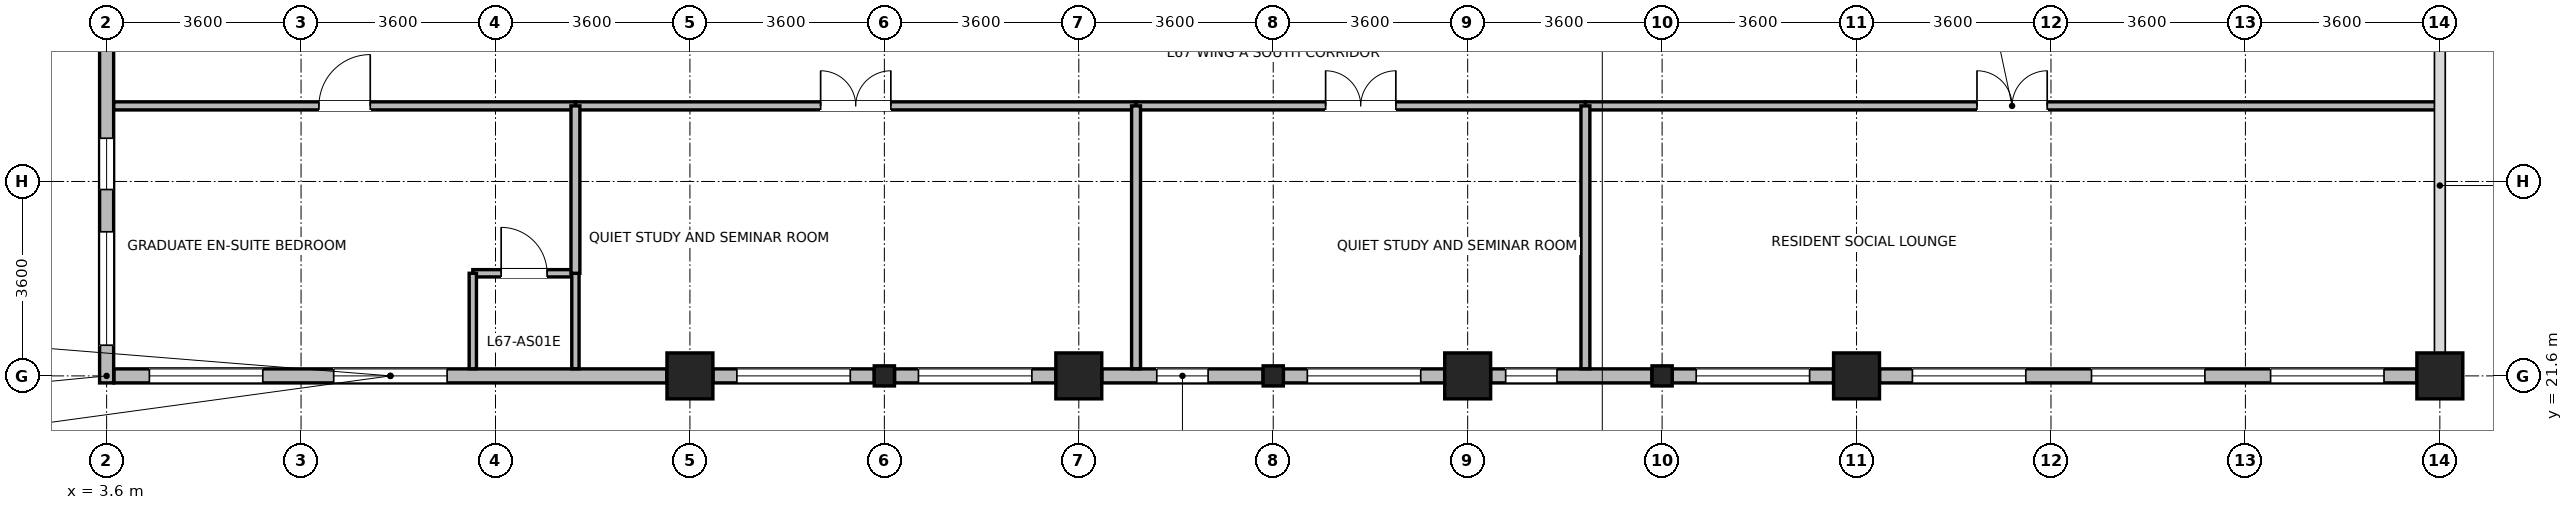
"""IFC4 building model, lengths in metres.
Left out: names, types, materials, properties, quantities, classifications, styles, units other than length and angle.
Written with IfcOpenShell. Run it as: python <this file> out.ifc"""

import sys

from ifc_helpers import new_model, si_unit, direction, frame, frame_2d, origin, origin_2d, place, context, subcontext, project, spatial, rectangle, i_section, extrude, source, transform, mapped, element, fill, save


model = new_model("IFC4")
c1 = context("Model", 3, precision=1e-05, world=origin(), true_north=direction((0.0, 1.0)))
c2 = subcontext(c1, "Body", "Model", "MODEL_VIEW")
j1 = project(units=[si_unit("LENGTHUNIT", "METRE"), si_unit("PLANEANGLEUNIT", "RADIAN")], contexts=[c1])
p1 = place(None, origin())
s1 = spatial("IfcSite", under=j1, at=p1, CompositionType="ELEMENT")
p2 = place(p1, origin())
s2 = spatial("IfcBuilding", under=s1, at=p2, CompositionType="ELEMENT")
p3 = place(p2, frame((0.0, 0.0, 261.0)))
s3 = spatial("IfcBuildingStorey", under=s2, at=p3, CompositionType="ELEMENT", Elevation=261.0)
m1 = source(origin(), c2, "Body", "SweptSolid", [
    extrude(rectangle(XDim=0.85, YDim=0.85, at=origin_2d()), origin(), (0.0, 0.0, 1.0), 3.7),
])
for number, where, z_axis, x_axis in (
    (1, (14.4, 21.6, 0.0), (0.0, 0.0, 1.0), (1.0, 0.0, 0.0)),
    (2, (21.6, 21.6, 0.0), (0.0, 0.0, 1.0), (1.0, 0.0, 0.0)),
    (3, (28.8, 21.6, 0.0), (0.0, 0.0, 1.0), (1.0, 0.0, 0.0)),
    (4, (36.0, 21.6, 0.0), (0.0, 0.0, 1.0), (1.0, 0.0, 0.0)),
    (5, (46.8, 21.6, 0.0), (0.0, 0.0, 1.0), (1.0, 0.0, 0.0)),
):
    element("IfcColumn", number, at=place(p3, frame(where, z_axis=z_axis, x_axis=x_axis)), inside=s3, PredefinedType="COLUMN", context=c2, shape_type="MappedRepresentation", body=[
        mapped(m1, transform((0.0, 0.0, 0.0), x_axis=(1.0, 0.0, 0.0), y_axis=(0.0, 1.0, 0.0), z_axis=(0.0, 0.0, 1.0), scale=1.0)),
    ])
m2 = source(origin(), c2, "Body", "SweptSolid", [
    extrude(i_section(OverallWidth=0.374, OverallDepth=0.372, WebThickness=0.015, FlangeThickness=0.026, FilletRadius=0.015, at=origin_2d()), origin(), (0.0, 0.0, 1.0), 3.7),
])
for number, where, z_axis, x_axis in (
    (6, (18.0, 21.6, 0.0), (0.0, 0.0, 1.0), (1.0, 0.0, 0.0)),
    (7, (25.2, 21.6, 0.0), (0.0, 0.0, 1.0), (1.0, 0.0, 0.0)),
    (8, (32.4, 21.6, 0.0), (0.0, 0.0, 1.0), (1.0, 0.0, 0.0)),
):
    element("IfcColumn", number, at=place(p3, frame(where, z_axis=z_axis, x_axis=x_axis)), inside=s3, PredefinedType="COLUMN", context=c2, shape_type="MappedRepresentation", body=[
        mapped(m2, transform((0.0, 0.0, 0.0), x_axis=(1.0, 0.0, 0.0), y_axis=(0.0, 1.0, 0.0), z_axis=(0.0, 0.0, 1.0), scale=1.0)),
    ])
p4 = place(p3, frame((13.974, 21.6, 0.0), z_axis=(0.0, 0.0, 1.0), x_axis=(-1.0, 0.0, 0.0)))
e9 = element("IfcWall", 9, at=p4, inside=s3, PredefinedType="STANDARD", context=c2, shape_type="SweptSolid", body=[
    extrude(rectangle(XDim=10.239, YDim=0.26, at=frame_2d((5.12, 0.0))), origin(), (0.0, 0.0, 1.0), 3.455),
])
p5 = place(p4, frame((4.07, 0.0, 0.85)))
e10 = element("IfcOpeningElement", 10, at=p5, cuts=e9, PredefinedType="OPENING", context=c2, shape_type="SweptSolid", body=[
    extrude(rectangle(XDim=2.1, YDim=1.95, at=frame_2d((1.05, 0.975))), frame((0.0, 0.14, 0.0), z_axis=(0.0, -1.0, 0.0), x_axis=(1.0, 0.0, 0.0)), (0.0, 0.0, 1.0), 0.28),
])
p6 = place(p4, frame((7.482, 0.0, 0.85)))
e11 = element("IfcOpeningElement", 11, at=p6, cuts=e9, PredefinedType="OPENING", context=c2, shape_type="SweptSolid", body=[
    extrude(rectangle(XDim=2.1, YDim=1.95, at=frame_2d((1.05, 0.975))), frame((0.0, 0.14, 0.0), z_axis=(0.0, -1.0, 0.0), x_axis=(1.0, 0.0, 0.0)), (0.0, 0.0, 1.0), 0.28),
])
p7 = place(p3, frame((17.812, 21.6, 0.0), z_axis=(0.0, 0.0, 1.0), x_axis=(-1.0, 0.0, 0.0)))
e12 = element("IfcWall", 12, at=p7, inside=s3, PredefinedType="STANDARD", context=c2, shape_type="SweptSolid", body=[
    extrude(rectangle(XDim=2.986, YDim=0.26, at=frame_2d((1.493, 0.0))), origin(), (0.0, 0.0, 1.0), 3.055),
])
p8 = place(p7, frame((0.443, 0.0, 0.85)))
e13 = element("IfcOpeningElement", 13, at=p8, cuts=e12, PredefinedType="OPENING", context=c2, shape_type="SweptSolid", body=[
    extrude(rectangle(XDim=2.1, YDim=1.95, at=frame_2d((1.05, 0.975))), frame((0.0, 0.14, 0.0), z_axis=(0.0, -1.0, 0.0), x_axis=(1.0, 0.0, 0.0)), (0.0, 0.0, 1.0), 0.28),
])
p9 = place(p3, frame((21.174, 21.6, 0.0), z_axis=(0.0, 0.0, 1.0), x_axis=(-1.0, 0.0, 0.0)))
e14 = element("IfcWall", 14, at=p9, inside=s3, PredefinedType="STANDARD", context=c2, shape_type="SweptSolid", body=[
    extrude(rectangle(XDim=2.986, YDim=0.26, at=frame_2d((1.493, 0.0))), origin(), (0.0, 0.0, 1.0), 3.055),
])
p10 = place(p9, frame((0.443, 0.0, 0.85)))
e15 = element("IfcOpeningElement", 15, at=p10, cuts=e14, PredefinedType="OPENING", context=c2, shape_type="SweptSolid", body=[
    extrude(rectangle(XDim=2.1, YDim=1.95, at=frame_2d((1.05, 0.975))), frame((0.0, 0.14, 0.0), z_axis=(0.0, -1.0, 0.0), x_axis=(1.0, 0.0, 0.0)), (0.0, 0.0, 1.0), 0.28),
])
p11 = place(p3, frame((25.012, 21.6, 0.0), z_axis=(0.0, 0.0, 1.0), x_axis=(-1.0, 0.0, 0.0)))
e16 = element("IfcWall", 16, at=p11, inside=s3, PredefinedType="STANDARD", context=c2, shape_type="SweptSolid", body=[
    extrude(rectangle(XDim=2.986, YDim=0.26, at=frame_2d((1.493, 0.0))), origin(), (0.0, 0.0, 1.0), 3.055),
])
p12 = place(p11, frame((1.018, 0.0, 0.85)))
e17 = element("IfcOpeningElement", 17, at=p12, cuts=e16, PredefinedType="OPENING", context=c2, shape_type="SweptSolid", body=[
    extrude(rectangle(XDim=0.95, YDim=1.75, at=frame_2d((0.475, 0.875))), frame((0.0, 0.14, 0.0), z_axis=(0.0, -1.0, 0.0), x_axis=(1.0, 0.0, 0.0)), (0.0, 0.0, 1.0), 0.28),
])
p13 = place(p3, frame((28.374, 21.6, 0.0), z_axis=(0.0, 0.0, 1.0), x_axis=(-1.0, 0.0, 0.0)))
e18 = element("IfcWall", 18, at=p13, inside=s3, PredefinedType="STANDARD", context=c2, shape_type="SweptSolid", body=[
    extrude(rectangle(XDim=2.986, YDim=0.26, at=frame_2d((1.493, 0.0))), origin(), (0.0, 0.0, 1.0), 3.055),
])
p14 = place(p13, frame((0.443, 0.0, 0.85)))
e19 = element("IfcOpeningElement", 19, at=p14, cuts=e18, PredefinedType="OPENING", context=c2, shape_type="SweptSolid", body=[
    extrude(rectangle(XDim=2.1, YDim=1.95, at=frame_2d((1.05, 0.975))), frame((0.0, 0.14, 0.0), z_axis=(0.0, -1.0, 0.0), x_axis=(1.0, 0.0, 0.0)), (0.0, 0.0, 1.0), 0.28),
])
p15 = place(p3, frame((32.212, 21.6, 0.0), z_axis=(0.0, 0.0, 1.0), x_axis=(-1.0, 0.0, 0.0)))
e20 = element("IfcWall", 20, at=p15, inside=s3, PredefinedType="STANDARD", context=c2, shape_type="SweptSolid", body=[
    extrude(rectangle(XDim=2.986, YDim=0.26, at=frame_2d((1.493, 0.0))), origin(), (0.0, 0.0, 1.0), 3.055),
])
p16 = place(p15, frame((1.759, 0.0, 0.85)))
e21 = element("IfcOpeningElement", 21, at=p16, cuts=e20, PredefinedType="OPENING", context=c2, shape_type="SweptSolid", body=[
    extrude(rectangle(XDim=0.95, YDim=1.75, at=frame_2d((0.475, 0.875))), frame((0.0, 0.14, 0.0), z_axis=(0.0, -1.0, 0.0), x_axis=(1.0, 0.0, 0.0)), (0.0, 0.0, 1.0), 0.28),
])
p17 = place(p3, frame((35.574, 21.6, 0.0), z_axis=(0.0, 0.0, 1.0), x_axis=(-1.0, 0.0, 0.0)))
e22 = element("IfcWall", 22, at=p17, inside=s3, PredefinedType="STANDARD", context=c2, shape_type="SweptSolid", body=[
    extrude(rectangle(XDim=2.986, YDim=0.26, at=frame_2d((1.493, 0.0))), origin(), (0.0, 0.0, 1.0), 3.055),
])
p18 = place(p17, frame((0.443, 0.0, 0.85)))
e23 = element("IfcOpeningElement", 23, at=p18, cuts=e22, PredefinedType="OPENING", context=c2, shape_type="SweptSolid", body=[
    extrude(rectangle(XDim=2.1, YDim=1.95, at=frame_2d((1.05, 0.975))), frame((0.0, 0.14, 0.0), z_axis=(0.0, -1.0, 0.0), x_axis=(1.0, 0.0, 0.0)), (0.0, 0.0, 1.0), 0.28),
])
p19 = place(p3, frame((46.374, 21.6, 0.0), z_axis=(0.0, 0.0, 1.0), x_axis=(-1.0, 0.0, 0.0)))
e24 = element("IfcWall", 24, at=p19, inside=s3, PredefinedType="STANDARD", context=c2, shape_type="SweptSolid", body=[
    extrude(rectangle(XDim=9.948, YDim=0.26, at=frame_2d((4.974, 0.0))), origin(), (0.0, 0.0, 1.0), 3.055),
])
p20 = place(p19, frame((0.608, 0.0, 0.85)))
e25 = element("IfcOpeningElement", 25, at=p20, cuts=e24, PredefinedType="OPENING", context=c2, shape_type="SweptSolid", body=[
    extrude(rectangle(XDim=2.1, YDim=1.95, at=frame_2d((1.05, 0.975))), frame((0.0, 0.14, 0.0), z_axis=(0.0, -1.0, 0.0), x_axis=(1.0, 0.0, 0.0)), (0.0, 0.0, 1.0), 0.28),
])
p21 = place(p19, frame((3.924, 0.0, 0.85)))
e26 = element("IfcOpeningElement", 26, at=p21, cuts=e24, PredefinedType="OPENING", context=c2, shape_type="SweptSolid", body=[
    extrude(rectangle(XDim=2.1, YDim=1.95, at=frame_2d((1.05, 0.975))), frame((0.0, 0.14, 0.0), z_axis=(0.0, -1.0, 0.0), x_axis=(1.0, 0.0, 0.0)), (0.0, 0.0, 1.0), 0.28),
])
p22 = place(p19, frame((7.24, 0.0, 0.85)))
e27 = element("IfcOpeningElement", 27, at=p22, cuts=e24, PredefinedType="OPENING", context=c2, shape_type="SweptSolid", body=[
    extrude(rectangle(XDim=2.1, YDim=1.95, at=frame_2d((1.05, 0.975))), frame((0.0, 0.14, 0.0), z_axis=(0.0, -1.0, 0.0), x_axis=(1.0, 0.0, 0.0)), (0.0, 0.0, 1.0), 0.28),
])
p23 = place(p3, frame((3.6, 21.47, 0.0), z_axis=(0.0, 0.0, 1.0), x_axis=(0.0, 1.0, 0.0)))
e28 = element("IfcWall", 28, at=p23, inside=s3, PredefinedType="STANDARD", context=c2, shape_type="SweptSolid", body=[
    extrude(rectangle(XDim=6.993, YDim=0.26, at=frame_2d((3.497, 0.0))), origin(), (0.0, 0.0, 1.0), 3.455),
])
p24 = place(p23, frame((0.698, 0.0, 0.85)))
e29 = element("IfcOpeningElement", 29, at=p24, cuts=e28, PredefinedType="OPENING", context=c2, shape_type="SweptSolid", body=[
    extrude(rectangle(XDim=2.1, YDim=1.95, at=frame_2d((1.05, 0.975))), frame((0.0, 0.14, 0.0), z_axis=(0.0, -1.0, 0.0), x_axis=(1.0, 0.0, 0.0)), (0.0, 0.0, 1.0), 0.28),
])
p25 = place(p23, frame((3.581, 0.0, 0.85)))
e30 = element("IfcOpeningElement", 30, at=p25, cuts=e28, PredefinedType="OPENING", context=c2, shape_type="SweptSolid", body=[
    extrude(rectangle(XDim=0.95, YDim=1.75, at=frame_2d((0.475, 0.875))), frame((0.0, 0.14, 0.0), z_axis=(0.0, -1.0, 0.0), x_axis=(1.0, 0.0, 0.0)), (0.0, 0.0, 1.0), 0.28),
])
p26 = place(p3, frame((10.38, 23.5, 0.0), z_axis=(0.0, 0.0, 1.0), x_axis=(1.0, 0.0, 0.0)))
e31 = element("IfcWall", 31, at=p26, inside=s3, PredefinedType="PARTITIONING", context=c2, shape_type="SweptSolid", body=[
    extrude(rectangle(XDim=1.9, YDim=0.135, at=frame_2d((0.95, 0.0))), origin(), (0.0, 0.0, 1.0), 3.455),
])
p27 = place(p26, frame((0.525, 0.0, 0.0)))
e32 = element("IfcOpeningElement", 32, at=p27, cuts=e31, PredefinedType="OPENING", context=c2, shape_type="SweptSolid", body=[
    extrude(rectangle(XDim=0.85, YDim=2.04, at=frame_2d((0.425, 1.02))), frame((0.0, 0.078, 0.0), z_axis=(0.0, -1.0, 0.0), x_axis=(1.0, 0.0, 0.0)), (0.0, 0.0, 1.0), 0.155),
])
for number, where, z_axis, x_axis in (
    (33, (10.38, 21.732, 0.0), (0.0, 0.0, 1.0), (0.0, 1.0, 0.0)),
    (34, (12.28, 21.732, 0.0), (0.0, 0.0, 1.0), (0.0, 1.0, 0.0)),
):
    element("IfcWall", number, at=place(p3, frame(where, z_axis=z_axis, x_axis=x_axis)), inside=s3, PredefinedType="PARTITIONING", context=c2, shape_type="SweptSolid", body=[
        extrude(rectangle(XDim=1.768, YDim=0.135, at=frame_2d((0.884, 0.0))), origin(), (0.0, 0.0, 1.0), 3.455),
    ])
p28 = place(p3, frame((30.98, 26.6, 0.0), z_axis=(0.0, 0.0, 1.0), x_axis=(1.0, 0.0, 0.0)))
e35 = element("IfcWall", 35, at=p28, inside=s3, PredefinedType="PARTITIONING", context=c2, shape_type="SweptSolid", body=[
    extrude(rectangle(XDim=15.8, YDim=0.15, at=frame_2d((7.9, 0.0))), origin(), (0.0, 0.0, 1.0), 3.455),
])
p29 = place(p28, frame((7.25, 0.0, 0.0)))
e36 = element("IfcOpeningElement", 36, at=p29, cuts=e35, PredefinedType="OPENING", context=c2, shape_type="SweptSolid", body=[
    extrude(rectangle(XDim=1.3, YDim=2.12, at=frame_2d((0.65, 1.06))), frame((0.0, 0.085, 0.0), z_axis=(0.0, -1.0, 0.0), x_axis=(1.0, 0.0, 0.0)), (0.0, 0.0, 1.0), 0.17),
])
p30 = place(p3, frame((12.28, 26.6, 0.0), z_axis=(0.0, 0.0, 1.0), x_axis=(1.0, 0.0, 0.0)))
e37 = element("IfcWall", 37, at=p30, inside=s3, PredefinedType="PARTITIONING", context=c2, shape_type="SweptSolid", body=[
    extrude(rectangle(XDim=10.38, YDim=0.15, at=frame_2d((5.19, 0.0))), origin(), (0.0, 0.0, 1.0), 3.455),
])
p31 = place(p30, frame((4.54, 0.0, 0.0)))
e38 = element("IfcOpeningElement", 38, at=p31, cuts=e37, PredefinedType="OPENING", context=c2, shape_type="SweptSolid", body=[
    extrude(rectangle(XDim=1.3, YDim=2.12, at=frame_2d((0.65, 1.06))), frame((0.0, 0.085, 0.0), z_axis=(0.0, -1.0, 0.0), x_axis=(1.0, 0.0, 0.0)), (0.0, 0.0, 1.0), 0.17),
])
p32 = place(p3, frame((3.732, 26.6, 0.0), z_axis=(0.0, 0.0, 1.0), x_axis=(1.0, 0.0, 0.0)))
e39 = element("IfcWall", 39, at=p32, inside=s3, PredefinedType="PARTITIONING", context=c2, shape_type="SweptSolid", body=[
    extrude(rectangle(XDim=8.548, YDim=0.15, at=frame_2d((4.274, 0.0))), origin(), (0.0, 0.0, 1.0), 3.455),
])
p33 = place(p32, frame((3.799, 0.0, 0.0)))
e40 = element("IfcOpeningElement", 40, at=p33, cuts=e39, PredefinedType="OPENING", context=c2, shape_type="SweptSolid", body=[
    extrude(rectangle(XDim=0.95, YDim=2.1, at=frame_2d((0.475, 1.05))), frame((0.0, 0.085, 0.0), z_axis=(0.0, -1.0, 0.0), x_axis=(1.0, 0.0, 0.0)), (0.0, 0.0, 1.0), 0.17),
])
p34 = place(p3, frame((22.66, 26.6, 0.0), z_axis=(0.0, 0.0, 1.0), x_axis=(1.0, 0.0, 0.0)))
e41 = element("IfcWall", 41, at=p34, inside=s3, PredefinedType="PARTITIONING", context=c2, shape_type="SweptSolid", body=[
    extrude(rectangle(XDim=8.32, YDim=0.15, at=frame_2d((4.16, 0.0))), origin(), (0.0, 0.0, 1.0), 3.455),
])
p35 = place(p34, frame((3.51, 0.0, 0.0)))
e42 = element("IfcOpeningElement", 42, at=p35, cuts=e41, PredefinedType="OPENING", context=c2, shape_type="SweptSolid", body=[
    extrude(rectangle(XDim=1.3, YDim=2.12, at=frame_2d((0.65, 1.06))), frame((0.0, 0.085, 0.0), z_axis=(0.0, -1.0, 0.0), x_axis=(1.0, 0.0, 0.0)), (0.0, 0.0, 1.0), 0.17),
])
for number, where, z_axis, x_axis in (
    (43, (22.66, 21.732, 0.0), (0.0, 0.0, 1.0), (0.0, 1.0, 0.0)),
    (44, (30.98, 21.732, 0.0), (0.0, 0.0, 1.0), (0.0, 1.0, 0.0)),
):
    element("IfcWall", number, at=place(p3, frame(where, z_axis=z_axis, x_axis=x_axis)), inside=s3, PredefinedType="PARTITIONING", context=c2, shape_type="SweptSolid", body=[
        extrude(rectangle(XDim=4.868, YDim=0.165, at=frame_2d((2.434, 0.0))), origin(), (0.0, 0.0, 1.0), 3.455),
    ])
p36 = place(p3, frame((12.28, 23.5, 0.0), z_axis=(0.0, 0.0, 1.0), x_axis=(0.0, 1.0, 0.0)))
e45 = element("IfcWall", 45, at=p36, inside=s3, PredefinedType="PARTITIONING", context=c2, shape_type="SweptSolid", body=[
    extrude(rectangle(XDim=3.1, YDim=0.165, at=frame_2d((1.55, 0.0))), origin(), (0.0, 0.0, 1.0), 3.455),
])
p37 = place(p5, origin())
e46 = element("IfcWindow", 46, at=p37, inside=s3, PartitioningType="SINGLE_PANEL", PredefinedType="WINDOW", context=c2, shape_type="SweptSolid", body=[
    extrude(rectangle(XDim=2.1, YDim=1.95, at=frame_2d((1.05, 0.975))), frame((0.0, 0.03, 0.0), z_axis=(0.0, -1.0, 0.0), x_axis=(1.0, 0.0, 0.0)), (0.0, 0.0, 1.0), 0.06),
])
fill(e10, e46)
p38 = place(p6, origin())
e47 = element("IfcWindow", 47, at=p38, inside=s3, PartitioningType="SINGLE_PANEL", PredefinedType="WINDOW", context=c2, shape_type="SweptSolid", body=[
    extrude(rectangle(XDim=2.1, YDim=1.95, at=frame_2d((1.05, 0.975))), frame((0.0, 0.03, 0.0), z_axis=(0.0, -1.0, 0.0), x_axis=(1.0, 0.0, 0.0)), (0.0, 0.0, 1.0), 0.06),
])
fill(e11, e47)
p39 = place(p8, origin())
e48 = element("IfcWindow", 48, at=p39, inside=s3, PartitioningType="SINGLE_PANEL", PredefinedType="WINDOW", context=c2, shape_type="SweptSolid", body=[
    extrude(rectangle(XDim=2.1, YDim=1.95, at=frame_2d((1.05, 0.975))), frame((0.0, 0.03, 0.0), z_axis=(0.0, -1.0, 0.0), x_axis=(1.0, 0.0, 0.0)), (0.0, 0.0, 1.0), 0.06),
])
fill(e13, e48)
p40 = place(p10, origin())
e49 = element("IfcWindow", 49, at=p40, inside=s3, PartitioningType="SINGLE_PANEL", PredefinedType="WINDOW", context=c2, shape_type="SweptSolid", body=[
    extrude(rectangle(XDim=2.1, YDim=1.95, at=frame_2d((1.05, 0.975))), frame((0.0, 0.03, 0.0), z_axis=(0.0, -1.0, 0.0), x_axis=(1.0, 0.0, 0.0)), (0.0, 0.0, 1.0), 0.06),
])
fill(e15, e49)
p41 = place(p12, origin())
e50 = element("IfcWindow", 50, at=p41, inside=s3, PartitioningType="SINGLE_PANEL", PredefinedType="WINDOW", context=c2, shape_type="SweptSolid", body=[
    extrude(rectangle(XDim=0.95, YDim=1.75, at=frame_2d((0.475, 0.875))), frame((0.0, 0.03, 0.0), z_axis=(0.0, -1.0, 0.0), x_axis=(1.0, 0.0, 0.0)), (0.0, 0.0, 1.0), 0.06),
])
fill(e17, e50)
p42 = place(p14, origin())
e51 = element("IfcWindow", 51, at=p42, inside=s3, PartitioningType="SINGLE_PANEL", PredefinedType="WINDOW", context=c2, shape_type="SweptSolid", body=[
    extrude(rectangle(XDim=2.1, YDim=1.95, at=frame_2d((1.05, 0.975))), frame((0.0, 0.03, 0.0), z_axis=(0.0, -1.0, 0.0), x_axis=(1.0, 0.0, 0.0)), (0.0, 0.0, 1.0), 0.06),
])
fill(e19, e51)
p43 = place(p16, origin())
e52 = element("IfcWindow", 52, at=p43, inside=s3, PartitioningType="SINGLE_PANEL", PredefinedType="WINDOW", context=c2, shape_type="SweptSolid", body=[
    extrude(rectangle(XDim=0.95, YDim=1.75, at=frame_2d((0.475, 0.875))), frame((0.0, 0.03, 0.0), z_axis=(0.0, -1.0, 0.0), x_axis=(1.0, 0.0, 0.0)), (0.0, 0.0, 1.0), 0.06),
])
fill(e21, e52)
p44 = place(p18, origin())
e53 = element("IfcWindow", 53, at=p44, inside=s3, PartitioningType="SINGLE_PANEL", PredefinedType="WINDOW", context=c2, shape_type="SweptSolid", body=[
    extrude(rectangle(XDim=2.1, YDim=1.95, at=frame_2d((1.05, 0.975))), frame((0.0, 0.03, 0.0), z_axis=(0.0, -1.0, 0.0), x_axis=(1.0, 0.0, 0.0)), (0.0, 0.0, 1.0), 0.06),
])
fill(e23, e53)
p45 = place(p20, origin())
e54 = element("IfcWindow", 54, at=p45, inside=s3, PartitioningType="SINGLE_PANEL", PredefinedType="WINDOW", context=c2, shape_type="SweptSolid", body=[
    extrude(rectangle(XDim=2.1, YDim=1.95, at=frame_2d((1.05, 0.975))), frame((0.0, 0.03, 0.0), z_axis=(0.0, -1.0, 0.0), x_axis=(1.0, 0.0, 0.0)), (0.0, 0.0, 1.0), 0.06),
])
fill(e25, e54)
p46 = place(p21, origin())
e55 = element("IfcWindow", 55, at=p46, inside=s3, PartitioningType="SINGLE_PANEL", PredefinedType="WINDOW", context=c2, shape_type="SweptSolid", body=[
    extrude(rectangle(XDim=2.1, YDim=1.95, at=frame_2d((1.05, 0.975))), frame((0.0, 0.03, 0.0), z_axis=(0.0, -1.0, 0.0), x_axis=(1.0, 0.0, 0.0)), (0.0, 0.0, 1.0), 0.06),
])
fill(e26, e55)
p47 = place(p22, origin())
e56 = element("IfcWindow", 56, at=p47, inside=s3, PartitioningType="SINGLE_PANEL", PredefinedType="WINDOW", context=c2, shape_type="SweptSolid", body=[
    extrude(rectangle(XDim=2.1, YDim=1.95, at=frame_2d((1.05, 0.975))), frame((0.0, 0.03, 0.0), z_axis=(0.0, -1.0, 0.0), x_axis=(1.0, 0.0, 0.0)), (0.0, 0.0, 1.0), 0.06),
])
fill(e27, e56)
p48 = place(p24, origin())
e57 = element("IfcWindow", 57, at=p48, inside=s3, PartitioningType="SINGLE_PANEL", PredefinedType="WINDOW", context=c2, shape_type="SweptSolid", body=[
    extrude(rectangle(XDim=2.1, YDim=1.95, at=frame_2d((1.05, 0.975))), frame((0.0, 0.03, 0.0), z_axis=(0.0, -1.0, 0.0), x_axis=(1.0, 0.0, 0.0)), (0.0, 0.0, 1.0), 0.06),
])
fill(e29, e57)
p49 = place(p25, origin())
e58 = element("IfcWindow", 58, at=p49, inside=s3, PartitioningType="SINGLE_PANEL", PredefinedType="WINDOW", context=c2, shape_type="SweptSolid", body=[
    extrude(rectangle(XDim=0.95, YDim=1.75, at=frame_2d((0.475, 0.875))), frame((0.0, 0.03, 0.0), z_axis=(0.0, -1.0, 0.0), x_axis=(1.0, 0.0, 0.0)), (0.0, 0.0, 1.0), 0.06),
])
fill(e30, e58)
p50 = place(p27, origin())
e59 = element("IfcDoor", 59, at=p50, inside=s3, OperationType="SINGLE_SWING_LEFT", PredefinedType="DOOR", context=c2, shape_type="SweptSolid", body=[
    extrude(rectangle(XDim=0.85, YDim=2.04, at=frame_2d((0.425, 1.02))), frame((0.0, 0.025, 0.0), z_axis=(0.0, -1.0, 0.0), x_axis=(1.0, 0.0, 0.0)), (0.0, 0.0, 1.0), 0.05),
])
fill(e32, e59)
p51 = place(p29, origin())
e60 = element("IfcDoor", 60, at=p51, inside=s3, OperationType="DOUBLE_DOOR_SINGLE_SWING", PredefinedType="DOOR", context=c2, shape_type="SweptSolid", body=[
    extrude(rectangle(XDim=1.3, YDim=2.12, at=frame_2d((0.65, 1.06))), frame((0.0, 0.025, 0.0), z_axis=(0.0, -1.0, 0.0), x_axis=(1.0, 0.0, 0.0)), (0.0, 0.0, 1.0), 0.05),
])
fill(e36, e60)
p52 = place(p31, origin())
e61 = element("IfcDoor", 61, at=p52, inside=s3, OperationType="DOUBLE_DOOR_SINGLE_SWING", PredefinedType="DOOR", context=c2, shape_type="SweptSolid", body=[
    extrude(rectangle(XDim=1.3, YDim=2.12, at=frame_2d((0.65, 1.06))), frame((0.0, 0.025, 0.0), z_axis=(0.0, -1.0, 0.0), x_axis=(1.0, 0.0, 0.0)), (0.0, 0.0, 1.0), 0.05),
])
fill(e38, e61)
p53 = place(p33, origin())
e62 = element("IfcDoor", 62, at=p53, inside=s3, OperationType="SINGLE_SWING_RIGHT", PredefinedType="DOOR", context=c2, shape_type="SweptSolid", body=[
    extrude(rectangle(XDim=0.95, YDim=2.1, at=frame_2d((0.475, 1.05))), frame((0.0, 0.025, 0.0), z_axis=(0.0, -1.0, 0.0), x_axis=(1.0, 0.0, 0.0)), (0.0, 0.0, 1.0), 0.05),
])
fill(e40, e62)
p54 = place(p35, origin())
e63 = element("IfcDoor", 63, at=p54, inside=s3, OperationType="DOUBLE_DOOR_SINGLE_SWING", PredefinedType="DOOR", context=c2, shape_type="SweptSolid", body=[
    extrude(rectangle(XDim=1.3, YDim=2.12, at=frame_2d((0.65, 1.06))), frame((0.0, 0.025, 0.0), z_axis=(0.0, -1.0, 0.0), x_axis=(1.0, 0.0, 0.0)), (0.0, 0.0, 1.0), 0.05),
])
fill(e42, e63)
save(model, sys.argv[1])
